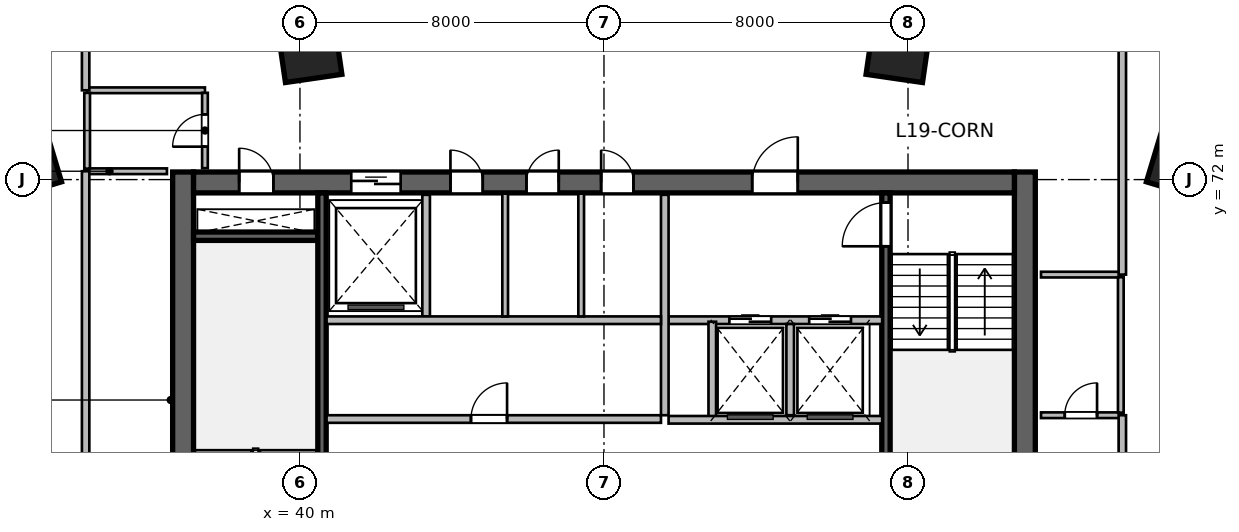
"""IFC4 building model, lengths in metres.
Left out: names, types, materials, properties, quantities, classifications, styles, units other than length and angle.
Written with IfcOpenShell. Run it as: python <this file> out.ifc"""

import sys

from ifc_helpers import new_model, si_unit, direction, frame, frame_2d, origin, origin_2d, place, context, subcontext, project, spatial, rectangle, extrude, source, transform, mapped, element, fill, save


model = new_model("IFC4")
c1 = context("Model", 3, precision=1e-05, world=origin(), true_north=direction((0.0, 1.0)))
c2 = subcontext(c1, "Body", "Model", "MODEL_VIEW")
j1 = project(units=[si_unit("LENGTHUNIT", "METRE"), si_unit("PLANEANGLEUNIT", "RADIAN")], contexts=[c1])
p1 = place(None, origin())
s1 = spatial("IfcSite", under=j1, at=p1, CompositionType="ELEMENT")
p2 = place(p1, origin())
s2 = spatial("IfcBuilding", under=s1, at=p2, CompositionType="ELEMENT")
p3 = place(p2, frame((0.0, 0.0, 82.2)))
s3 = spatial("IfcBuildingStorey", under=s2, at=p3, CompositionType="ELEMENT", Elevation=82.2)
m1 = source(origin(), c2, "Body", "SweptSolid", [
    extrude(rectangle(XDim=12.0, YDim=0.55, at=frame_2d((6.0, 0.0))), origin(), (0.0, 0.0, 1.0), 3.6),
])
for number, where, z_axis, x_axis in (
    (1, (36.925, 60.2, 0.0), (0.0, 0.0, 1.0), (0.0, 1.0, 0.0)),
    (2, (59.075, 60.2, 0.0), (0.0, 0.0, 1.0), (0.0, 1.0, 0.0)),
):
    element("IfcWall", number, at=place(p3, frame(where, z_axis=z_axis, x_axis=x_axis)), inside=s3, PredefinedType="SHEAR", context=c2, shape_type="MappedRepresentation", body=[
        mapped(m1, transform((0.0, 0.0, 0.0), scale=1.0)),
    ])
m2 = source(origin(), c2, "Body", "SweptSolid", [
    extrude(rectangle(XDim=21.6, YDim=0.55, at=frame_2d((10.8, 0.0))), origin(), (0.0, 0.0, 1.0), 3.6),
])
p4 = place(p3, frame((37.2, 71.925, 0.0), z_axis=(0.0, 0.0, 1.0), x_axis=(1.0, 0.0, 0.0)))
e3 = element("IfcWall", 3, at=p4, inside=s3, PredefinedType="SHEAR", context=c2, shape_type="MappedRepresentation", body=[
    mapped(m2, transform((0.0, 0.0, 0.0), scale=1.0)),
])
p5 = place(p4, frame((1.2, 0.0, 0.0)))
e4 = element("IfcOpeningElement", 4, at=p5, cuts=e3, PredefinedType="OPENING", context=c2, shape_type="SweptSolid", body=[
    extrude(rectangle(XDim=0.9, YDim=2.1, at=frame_2d((0.45, 1.05))), frame((0.0, 0.285, 0.0), z_axis=(0.0, -1.0, 0.0), x_axis=(1.0, 0.0, 0.0)), (0.0, 0.0, 1.0), 0.57),
])
p6 = place(p4, frame((14.7, 0.0, 0.0)))
e5 = element("IfcOpeningElement", 5, at=p6, cuts=e3, PredefinedType="OPENING", context=c2, shape_type="SweptSolid", body=[
    extrude(rectangle(XDim=1.2, YDim=2.15, at=frame_2d((0.6, 1.075))), frame((0.0, 0.285, 0.0), z_axis=(0.0, -1.0, 0.0), x_axis=(1.0, 0.0, 0.0)), (0.0, 0.0, 1.0), 0.57),
])
p7 = place(p4, frame((4.15, 0.0, 0.0)))
e6 = element("IfcOpeningElement", 6, at=p7, cuts=e3, PredefinedType="OPENING", context=c2, shape_type="SweptSolid", body=[
    extrude(rectangle(XDim=1.3, YDim=2.15, at=frame_2d((0.65, 1.075))), frame((0.0, 0.285, 0.0), z_axis=(0.0, -1.0, 0.0), x_axis=(1.0, 0.0, 0.0)), (0.0, 0.0, 1.0), 0.57),
])
p8 = place(p4, frame((6.76, 0.0, 0.0)))
e7 = element("IfcOpeningElement", 7, at=p8, cuts=e3, PredefinedType="OPENING", context=c2, shape_type="SweptSolid", body=[
    extrude(rectangle(XDim=0.85, YDim=2.1, at=frame_2d((0.425, 1.05))), frame((0.0, 0.285, 0.0), z_axis=(0.0, -1.0, 0.0), x_axis=(1.0, 0.0, 0.0)), (0.0, 0.0, 1.0), 0.57),
])
p9 = place(p4, frame((8.76, 0.0, 0.0)))
e8 = element("IfcOpeningElement", 8, at=p9, cuts=e3, PredefinedType="OPENING", context=c2, shape_type="SweptSolid", body=[
    extrude(rectangle(XDim=0.85, YDim=2.1, at=frame_2d((0.425, 1.05))), frame((0.0, 0.285, 0.0), z_axis=(0.0, -1.0, 0.0), x_axis=(1.0, 0.0, 0.0)), (0.0, 0.0, 1.0), 0.57),
])
p10 = place(p4, frame((10.725, 0.0, 0.0)))
e9 = element("IfcOpeningElement", 9, at=p10, cuts=e3, PredefinedType="OPENING", context=c2, shape_type="SweptSolid", body=[
    extrude(rectangle(XDim=0.85, YDim=2.1, at=frame_2d((0.425, 1.05))), frame((0.0, 0.285, 0.0), z_axis=(0.0, -1.0, 0.0), x_axis=(1.0, 0.0, 0.0)), (0.0, 0.0, 1.0), 0.57),
])
m3 = source(origin(), c2, "Body", "SweptSolid", [
    extrude(rectangle(XDim=3.27, YDim=0.22, at=frame_2d((1.635, 0.0))), origin(), (0.0, 0.0, 1.0), 3.6),
])
p11 = place(p3, frame((37.2, 70.51, 0.0), z_axis=(0.0, 0.0, 1.0), x_axis=(1.0, 0.0, 0.0)))
e10 = element("IfcWall", 10, at=p11, inside=s3, PredefinedType="SHEAR", context=c2, shape_type="MappedRepresentation", body=[
    mapped(m3, transform((0.0, 0.0, 0.0), scale=1.0)),
])
m4 = source(origin(), c2, "Body", "SweptSolid", [
    extrude(rectangle(XDim=10.9, YDim=0.22, at=frame_2d((5.45, 0.0))), origin(), (0.0, 0.0, 1.0), 3.6),
])
p12 = place(p3, frame((40.58, 60.75, 0.0), z_axis=(0.0, 0.0, 1.0), x_axis=(0.0, 1.0, 0.0)))
e11 = element("IfcWall", 11, at=p12, inside=s3, PredefinedType="SHEAR", context=c2, shape_type="MappedRepresentation", body=[
    mapped(m4, transform((0.0, 0.0, 0.0), scale=1.0)),
])
p13 = place(p3, frame((55.42, 60.75, 0.0), z_axis=(0.0, 0.0, 1.0), x_axis=(0.0, 1.0, 0.0)))
e12 = element("IfcWall", 12, at=p13, inside=s3, PredefinedType="SHEAR", context=c2, shape_type="MappedRepresentation", body=[
    mapped(m4, transform((0.0, 0.0, 0.0), scale=1.0)),
])
p14 = place(p13, frame((9.495, 0.0, 0.0)))
e13 = element("IfcOpeningElement", 13, at=p14, cuts=e12, PredefinedType="OPENING", context=c2, shape_type="SweptSolid", body=[
    extrude(rectangle(XDim=1.15, YDim=2.15, at=frame_2d((0.575, 1.075))), frame((0.0, 0.12, 0.0), z_axis=(0.0, -1.0, 0.0), x_axis=(1.0, 0.0, 0.0)), (0.0, 0.0, 1.0), 0.24),
])
m5 = source(origin(), c2, "Body", "SweptSolid", [
    extrude(rectangle(XDim=1.5, YDim=1.5, at=origin_2d()), origin(), (0.0, 0.0, 1.0), 3.6),
])
for number, where, z_axis, x_axis in (
    (14, (32.791, 72.442, 0.0), (0.0, 0.0, 1.0), (-0.289, 0.957, 0.0)),
    (15, (40.253, 75.404, 0.0), (0.0, 0.0, 1.0), (-0.143, 0.99, 0.0)),
    (16, (55.747, 75.404, 0.0), (0.0, 0.0, 1.0), (0.143, 0.99, 0.0)),
    (17, (63.209, 72.442, 0.0), (0.0, 0.0, 1.0), (0.289, 0.957, 0.0)),
):
    element("IfcColumn", number, at=place(p3, frame(where, z_axis=z_axis, x_axis=x_axis)), inside=s3, PredefinedType="COLUMN", context=c2, shape_type="MappedRepresentation", body=[
        mapped(m5, transform((0.0, 0.0, 0.0), scale=1.0)),
    ])
m6 = source(origin(), c2, "Body", "SweptSolid", [
    extrude(rectangle(XDim=5.62, YDim=0.2, at=frame_2d((2.81, 0.0))), origin(), (0.0, 0.0, 1.0), 3.28),
])
p15 = place(p3, frame((49.7, 68.3, 0.0), z_axis=(0.0, 0.0, 1.0), x_axis=(1.0, 0.0, 0.0)))
e18 = element("IfcWall", 18, at=p15, inside=s3, PredefinedType="SOLIDWALL", context=c2, shape_type="MappedRepresentation", body=[
    mapped(m6, transform((0.0, 0.0, 0.0), scale=1.0)),
])
p16 = place(p15, frame((1.6, 0.0, 0.0)))
e19 = element("IfcOpeningElement", 19, at=p16, cuts=e18, PredefinedType="OPENING", context=c2, shape_type="SweptSolid", body=[
    extrude(rectangle(XDim=1.1, YDim=2.15, at=frame_2d((0.55, 1.075))), frame((0.0, 0.11, 0.0), z_axis=(0.0, -1.0, 0.0), x_axis=(1.0, 0.0, 0.0)), (0.0, 0.0, 1.0), 0.22),
])
p17 = place(p15, frame((3.7, 0.0, 0.0)))
e20 = element("IfcOpeningElement", 20, at=p17, cuts=e18, PredefinedType="OPENING", context=c2, shape_type="SweptSolid", body=[
    extrude(rectangle(XDim=1.1, YDim=2.15, at=frame_2d((0.55, 1.075))), frame((0.0, 0.11, 0.0), z_axis=(0.0, -1.0, 0.0), x_axis=(1.0, 0.0, 0.0)), (0.0, 0.0, 1.0), 0.22),
])
m7 = source(origin(), c2, "Body", "SweptSolid", [
    extrude(rectangle(XDim=5.8, YDim=0.2, at=frame_2d((2.9, 0.0))), origin(), (0.0, 0.0, 1.0), 3.28),
])
p18 = place(p3, frame((49.6, 65.8, 0.0), z_axis=(0.0, 0.0, 1.0), x_axis=(0.0, 1.0, 0.0)))
e21 = element("IfcWall", 21, at=p18, inside=s3, PredefinedType="SOLIDWALL", context=c2, shape_type="MappedRepresentation", body=[
    mapped(m7, transform((0.0, 0.0, 0.0), scale=1.0)),
])
m8 = source(origin(), c2, "Body", "SweptSolid", [
    extrude(rectangle(XDim=2.58, YDim=0.2, at=frame_2d((1.29, 0.0))), origin(), (0.0, 0.0, 1.0), 3.28),
])
p19 = place(p3, frame((50.85, 65.68, 0.0), z_axis=(0.0, 0.0, 1.0), x_axis=(0.0, 1.0, 0.0)))
e22 = element("IfcWall", 22, at=p19, inside=s3, PredefinedType="SOLIDWALL", context=c2, shape_type="MappedRepresentation", body=[
    mapped(m8, transform((0.0, 0.0, 0.0), scale=1.0)),
])
m9 = source(origin(), c2, "Body", "SweptSolid", [
    extrude(rectangle(XDim=2.4, YDim=0.2, at=frame_2d((1.2, 0.0))), origin(), (0.0, 0.0, 1.0), 3.28),
])
p20 = place(p3, frame((52.9, 65.8, 0.0), z_axis=(0.0, 0.0, 1.0), x_axis=(0.0, 1.0, 0.0)))
e23 = element("IfcWall", 23, at=p20, inside=s3, PredefinedType="SOLIDWALL", context=c2, shape_type="MappedRepresentation", body=[
    mapped(m9, transform((0.0, 0.0, 0.0), scale=1.0)),
])
p21 = place(p3, frame((49.7, 65.68, 0.0), z_axis=(0.0, 0.0, 1.0), x_axis=(1.0, 0.0, 0.0)))
e24 = element("IfcWall", 24, at=p21, inside=s3, PredefinedType="SOLIDWALL", context=c2, shape_type="MappedRepresentation", body=[
    mapped(m6, transform((0.0, 0.0, 0.0), scale=1.0)),
])
m10 = source(origin(), c2, "Body", "SweptSolid", [
    extrude(rectangle(XDim=3.2, YDim=0.2, at=frame_2d((1.6, 0.0))), origin(), (0.0, 0.0, 1.0), 3.28),
])
p22 = place(p3, frame((43.32, 68.4, 0.0), z_axis=(0.0, 0.0, 1.0), x_axis=(0.0, 1.0, 0.0)))
e25 = element("IfcWall", 25, at=p22, inside=s3, PredefinedType="SOLIDWALL", context=c2, shape_type="MappedRepresentation", body=[
    mapped(m10, transform((0.0, 0.0, 0.0), scale=1.0)),
])
m11 = source(origin(), c2, "Body", "SweptSolid", [
    extrude(rectangle(XDim=8.8, YDim=0.2, at=frame_2d((4.4, 0.0))), origin(), (0.0, 0.0, 1.0), 3.28),
])
p23 = place(p3, frame((40.7, 68.3, 0.0), z_axis=(0.0, 0.0, 1.0), x_axis=(1.0, 0.0, 0.0)))
e26 = element("IfcWall", 26, at=p23, inside=s3, PredefinedType="SOLIDWALL", context=c2, shape_type="MappedRepresentation", body=[
    mapped(m11, transform((0.0, 0.0, 0.0), scale=1.0)),
])
m12 = source(origin(), c2, "Body", "SweptSolid", [
    extrude(rectangle(XDim=3.23, YDim=0.15, at=frame_2d((1.615, 0.0))), origin(), (0.0, 0.0, 1.0), 3.28),
])
for number, where, z_axis, x_axis in (
    (27, (45.4, 68.4, 0.0), (0.0, 0.0, 1.0), (0.0, 1.0, 0.0)),
    (28, (47.4, 68.4, 0.0), (0.0, 0.0, 1.0), (0.0, 1.0, 0.0)),
):
    element("IfcWall", number, at=place(p3, frame(where, z_axis=z_axis, x_axis=x_axis)), inside=s3, PredefinedType="PARTITIONING", context=c2, shape_type="MappedRepresentation", body=[
        mapped(m12, transform((0.0, 0.0, 0.0), scale=1.0)),
    ])
p24 = place(p3, frame((40.7, 65.7, 0.0), z_axis=(0.0, 0.0, 1.0), x_axis=(1.0, 0.0, 0.0)))
e29 = element("IfcWall", 29, at=p24, inside=s3, PredefinedType="SOLIDWALL", context=c2, shape_type="MappedRepresentation", body=[
    mapped(m11, transform((0.0, 0.0, 0.0), scale=1.0)),
])
p25 = place(p24, frame((3.8, 0.0, 0.0)))
e30 = element("IfcOpeningElement", 30, at=p25, cuts=e29, PredefinedType="OPENING", context=c2, shape_type="SweptSolid", body=[
    extrude(rectangle(XDim=0.95, YDim=2.15, at=frame_2d((0.475, 1.075))), frame((0.0, 0.11, 0.0), z_axis=(0.0, -1.0, 0.0), x_axis=(1.0, 0.0, 0.0)), (0.0, 0.0, 1.0), 0.22),
])
m13 = source(origin(), c2, "Body", "SweptSolid", [
    extrude(rectangle(XDim=2.1, YDim=0.15, at=frame_2d((1.05, 0.0))), origin(), (0.0, 0.0, 1.0), 3.28),
])
p26 = place(p3, frame((34.4, 72.22, 0.0), z_axis=(0.0, 0.0, 1.0), x_axis=(1.0, 0.0, 0.0)))
e31 = element("IfcWall", 31, at=p26, inside=s3, PredefinedType="PARTITIONING", context=c2, shape_type="MappedRepresentation", body=[
    mapped(m13, transform((0.0, 0.0, 0.0), scale=1.0)),
])
m14 = source(origin(), c2, "Body", "SweptSolid", [
    extrude(rectangle(XDim=3.1, YDim=0.15, at=frame_2d((1.55, 0.0))), origin(), (0.0, 0.0, 1.0), 2.649),
])
p27 = place(p3, frame((34.4, 74.35, 0.0), z_axis=(0.0, 0.0, 1.0), x_axis=(1.0, 0.0, 0.0)))
e32 = element("IfcWall", 32, at=p27, inside=s3, PredefinedType="PARTITIONING", context=c2, shape_type="MappedRepresentation", body=[
    mapped(m14, transform((0.0, 0.0, 0.0), scale=1.0)),
])
m15 = source(origin(), c2, "Body", "SweptSolid", [
    extrude(rectangle(XDim=1.995, YDim=0.15, at=frame_2d((0.998, 0.0))), origin(), (0.0, 0.0, 1.0), 3.28),
])
p28 = place(p3, frame((34.4, 72.288, 0.0), z_axis=(0.0, 0.0, 1.0), x_axis=(0.0, 1.0, 0.0)))
e33 = element("IfcWall", 33, at=p28, inside=s3, PredefinedType="PARTITIONING", context=c2, shape_type="MappedRepresentation", body=[
    mapped(m15, transform((0.0, 0.0, 0.0), scale=1.0)),
])
m16 = source(origin(), c2, "Body", "SweptSolid", [
    extrude(rectangle(XDim=1.982, YDim=0.15, at=frame_2d((0.991, 0.0))), origin(), (0.0, 0.0, 1.0), 3.28),
])
p29 = place(p3, frame((37.5, 72.3, 0.0), z_axis=(0.0, 0.0, 1.0), x_axis=(0.0, 1.0, 0.0)))
e34 = element("IfcWall", 34, at=p29, inside=s3, PredefinedType="PARTITIONING", context=c2, shape_type="MappedRepresentation", body=[
    mapped(m16, transform((0.0, 0.0, 0.0), scale=1.0)),
])
p30 = place(p29, frame((0.566, 0.0, 0.0)))
e35 = element("IfcOpeningElement", 35, at=p30, cuts=e34, PredefinedType="OPENING", context=c2, shape_type="SweptSolid", body=[
    extrude(rectangle(XDim=0.85, YDim=2.1, at=frame_2d((0.425, 1.05))), frame((0.0, 0.085, 0.0), z_axis=(0.0, -1.0, 0.0), x_axis=(1.0, 0.0, 0.0)), (0.0, 0.0, 1.0), 0.17),
])
p31 = place(p3, frame((59.5, 65.8, 0.0), z_axis=(0.0, 0.0, 1.0), x_axis=(1.0, 0.0, 0.0)))
e36 = element("IfcWall", 36, at=p31, inside=s3, PredefinedType="PARTITIONING", context=c2, shape_type="MappedRepresentation", body=[
    mapped(m13, transform((0.0, 0.0, 0.0), scale=1.0)),
])
p32 = place(p31, frame((0.625, 0.0, 0.0)))
e37 = element("IfcOpeningElement", 37, at=p32, cuts=e36, PredefinedType="OPENING", context=c2, shape_type="SweptSolid", body=[
    extrude(rectangle(XDim=0.85, YDim=2.1, at=frame_2d((0.425, 1.05))), frame((0.0, 0.085, 0.0), z_axis=(0.0, -1.0, 0.0), x_axis=(1.0, 0.0, 0.0)), (0.0, 0.0, 1.0), 0.17),
])
p33 = place(p3, frame((59.5, 69.5, 0.0), z_axis=(0.0, 0.0, 1.0), x_axis=(1.0, 0.0, 0.0)))
e38 = element("IfcWall", 38, at=p33, inside=s3, PredefinedType="PARTITIONING", context=c2, shape_type="MappedRepresentation", body=[
    mapped(m13, transform((0.0, 0.0, 0.0), scale=1.0)),
])
m17 = source(origin(), c2, "Body", "SweptSolid", [
    extrude(rectangle(XDim=3.565, YDim=0.15, at=frame_2d((1.783, 0.0))), origin(), (0.0, 0.0, 1.0), 3.28),
])
p34 = place(p3, frame((61.6, 65.867, 0.0), z_axis=(0.0, 0.0, 1.0), x_axis=(0.0, 1.0, 0.0)))
e39 = element("IfcWall", 39, at=p34, inside=s3, PredefinedType="PARTITIONING", context=c2, shape_type="MappedRepresentation", body=[
    mapped(m17, transform((0.0, 0.0, 0.0), scale=1.0)),
])
m18 = source(origin(), c2, "Body", "SweptSolid", [
    extrude(rectangle(XDim=8.18, YDim=0.195, at=frame_2d((4.09, 0.0))), origin(), (0.0, 0.0, 1.0), 3.28),
])
p35 = place(p3, frame((34.36, 64.04, 0.0), z_axis=(0.0, 0.0, 1.0), x_axis=(0.0, 1.0, 0.0)))
e40 = element("IfcWall", 40, at=p35, inside=s3, PredefinedType="PARTITIONING", context=c2, shape_type="MappedRepresentation", body=[
    mapped(m18, transform((0.0, 0.0, 0.0), scale=1.0)),
])
m19 = source(origin(), c2, "Body", "SweptSolid", [
    extrude(rectangle(XDim=3.474, YDim=0.195, at=frame_2d((1.737, 0.0))), origin(), (0.0, 0.0, 1.0), 3.28),
])
p36 = place(p3, frame((34.36, 74.35, 0.0), z_axis=(0.0, 0.0, 1.0), x_axis=(0.0, 1.0, 0.0)))
e41 = element("IfcWall", 41, at=p36, inside=s3, PredefinedType="PARTITIONING", context=c2, shape_type="MappedRepresentation", body=[
    mapped(m19, transform((0.0, 0.0, 0.0), scale=1.0)),
])
m20 = source(origin(), c2, "Body", "SweptSolid", [
    extrude(rectangle(XDim=1.76, YDim=0.195, at=frame_2d((0.88, 0.0))), origin(), (0.0, 0.0, 1.0), 3.28),
])
p37 = place(p3, frame((61.64, 64.04, 0.0), z_axis=(0.0, 0.0, 1.0), x_axis=(0.0, 1.0, 0.0)))
e42 = element("IfcWall", 42, at=p37, inside=s3, PredefinedType="PARTITIONING", context=c2, shape_type="MappedRepresentation", body=[
    mapped(m20, transform((0.0, 0.0, 0.0), scale=1.0)),
])
m21 = source(origin(), c2, "Body", "SweptSolid", [
    extrude(rectangle(XDim=8.324, YDim=0.195, at=frame_2d((4.162, 0.0))), origin(), (0.0, 0.0, 1.0), 3.28),
])
p38 = place(p3, frame((61.64, 69.5, 0.0), z_axis=(0.0, 0.0, 1.0), x_axis=(0.0, 1.0, 0.0)))
e43 = element("IfcWall", 43, at=p38, inside=s3, PredefinedType="PARTITIONING", context=c2, shape_type="MappedRepresentation", body=[
    mapped(m21, transform((0.0, 0.0, 0.0), scale=1.0)),
])
m22 = source(origin(), c2, "Body", "SweptSolid", [
    extrude(rectangle(XDim=0.9, YDim=2.1, at=frame_2d((0.45, 1.05))), frame((0.0, 0.025, 0.0), z_axis=(0.0, -1.0, 0.0), x_axis=(1.0, 0.0, 0.0)), (0.0, 0.0, 1.0), 0.05),
])
p39 = place(p5, origin())
e44 = element("IfcDoor", 44, at=p39, inside=s3, OperationType="SINGLE_SWING_LEFT", PredefinedType="DOOR", context=c2, shape_type="MappedRepresentation", body=[
    mapped(m22, transform((0.0, 0.0, 0.0), scale=1.0)),
])
fill(e4, e44)
m23 = source(origin(), c2, "Body", "SweptSolid", [
    extrude(rectangle(XDim=1.15, YDim=2.15, at=frame_2d((0.575, 1.075))), frame((0.0, 0.025, 0.0), z_axis=(0.0, -1.0, 0.0), x_axis=(1.0, 0.0, 0.0)), (0.0, 0.0, 1.0), 0.05),
])
p40 = place(p14, origin())
e45 = element("IfcDoor", 45, at=p40, inside=s3, OperationType="SINGLE_SWING_LEFT", PredefinedType="DOOR", context=c2, shape_type="MappedRepresentation", body=[
    mapped(m23, transform((0.0, 0.0, 0.0), scale=1.0)),
])
fill(e13, e45)
m24 = source(origin(), c2, "Body", "SweptSolid", [
    extrude(rectangle(XDim=1.2, YDim=2.15, at=frame_2d((0.6, 1.075))), frame((0.0, 0.025, 0.0), z_axis=(0.0, -1.0, 0.0), x_axis=(1.0, 0.0, 0.0)), (0.0, 0.0, 1.0), 0.05),
])
p41 = place(p6, origin())
e46 = element("IfcDoor", 46, at=p41, inside=s3, OperationType="SINGLE_SWING_RIGHT", PredefinedType="DOOR", context=c2, shape_type="MappedRepresentation", body=[
    mapped(m24, transform((0.0, 0.0, 0.0), scale=1.0)),
])
fill(e5, e46)
m25 = source(origin(), c2, "Body", "SweptSolid", [
    extrude(rectangle(XDim=1.1, YDim=2.15, at=frame_2d((0.55, 1.075))), frame((0.0, 0.025, 0.0), z_axis=(0.0, -1.0, 0.0), x_axis=(1.0, 0.0, 0.0)), (0.0, 0.0, 1.0), 0.05),
])
p42 = place(p16, origin())
e47 = element("IfcDoor", 47, at=p42, inside=s3, OperationType="DOUBLE_DOOR_SLIDING", PredefinedType="DOOR", context=c2, shape_type="MappedRepresentation", body=[
    mapped(m25, transform((0.0, 0.0, 0.0), scale=1.0)),
])
fill(e19, e47)
p43 = place(p17, origin())
e48 = element("IfcDoor", 48, at=p43, inside=s3, OperationType="DOUBLE_DOOR_SLIDING", PredefinedType="DOOR", context=c2, shape_type="MappedRepresentation", body=[
    mapped(m25, transform((0.0, 0.0, 0.0), scale=1.0)),
])
fill(e20, e48)
m26 = source(origin(), c2, "Body", "SweptSolid", [
    extrude(rectangle(XDim=1.3, YDim=2.15, at=frame_2d((0.65, 1.075))), frame((0.0, 0.025, 0.0), z_axis=(0.0, -1.0, 0.0), x_axis=(1.0, 0.0, 0.0)), (0.0, 0.0, 1.0), 0.05),
])
p44 = place(p7, origin())
e49 = element("IfcDoor", 49, at=p44, inside=s3, OperationType="DOUBLE_DOOR_SLIDING", PredefinedType="DOOR", context=c2, shape_type="MappedRepresentation", body=[
    mapped(m26, transform((0.0, 0.0, 0.0), scale=1.0)),
])
fill(e6, e49)
m27 = source(origin(), c2, "Body", "SweptSolid", [
    extrude(rectangle(XDim=0.85, YDim=2.1, at=frame_2d((0.425, 1.05))), frame((0.0, 0.025, 0.0), z_axis=(0.0, -1.0, 0.0), x_axis=(1.0, 0.0, 0.0)), (0.0, 0.0, 1.0), 0.05),
])
p45 = place(p8, origin())
e50 = element("IfcDoor", 50, at=p45, inside=s3, OperationType="SINGLE_SWING_LEFT", PredefinedType="DOOR", context=c2, shape_type="MappedRepresentation", body=[
    mapped(m27, transform((0.0, 0.0, 0.0), scale=1.0)),
])
fill(e7, e50)
p46 = place(p9, origin())
e51 = element("IfcDoor", 51, at=p46, inside=s3, OperationType="SINGLE_SWING_RIGHT", PredefinedType="DOOR", context=c2, shape_type="MappedRepresentation", body=[
    mapped(m27, transform((0.0, 0.0, 0.0), scale=1.0)),
])
fill(e8, e51)
p47 = place(p10, origin())
e52 = element("IfcDoor", 52, at=p47, inside=s3, OperationType="SINGLE_SWING_LEFT", PredefinedType="DOOR", context=c2, shape_type="MappedRepresentation", body=[
    mapped(m27, transform((0.0, 0.0, 0.0), scale=1.0)),
])
fill(e9, e52)
m28 = source(origin(), c2, "Body", "SweptSolid", [
    extrude(rectangle(XDim=0.95, YDim=2.15, at=frame_2d((0.475, 1.075))), frame((0.0, 0.025, 0.0), z_axis=(0.0, -1.0, 0.0), x_axis=(1.0, 0.0, 0.0)), (0.0, 0.0, 1.0), 0.05),
])
p48 = place(p25, origin())
e53 = element("IfcDoor", 53, at=p48, inside=s3, OperationType="SINGLE_SWING_RIGHT", PredefinedType="DOOR", context=c2, shape_type="MappedRepresentation", body=[
    mapped(m28, transform((0.0, 0.0, 0.0), scale=1.0)),
])
fill(e30, e53)
p49 = place(p30, origin())
e54 = element("IfcDoor", 54, at=p49, inside=s3, OperationType="SINGLE_SWING_LEFT", PredefinedType="DOOR", context=c2, shape_type="MappedRepresentation", body=[
    mapped(m27, transform((0.0, 0.0, 0.0), scale=1.0)),
])
fill(e35, e54)
p50 = place(p32, origin())
e55 = element("IfcDoor", 55, at=p50, inside=s3, OperationType="SINGLE_SWING_RIGHT", PredefinedType="DOOR", context=c2, shape_type="MappedRepresentation", body=[
    mapped(m27, transform((0.0, 0.0, 0.0), scale=1.0)),
])
fill(e37, e55)
save(model, sys.argv[1])
